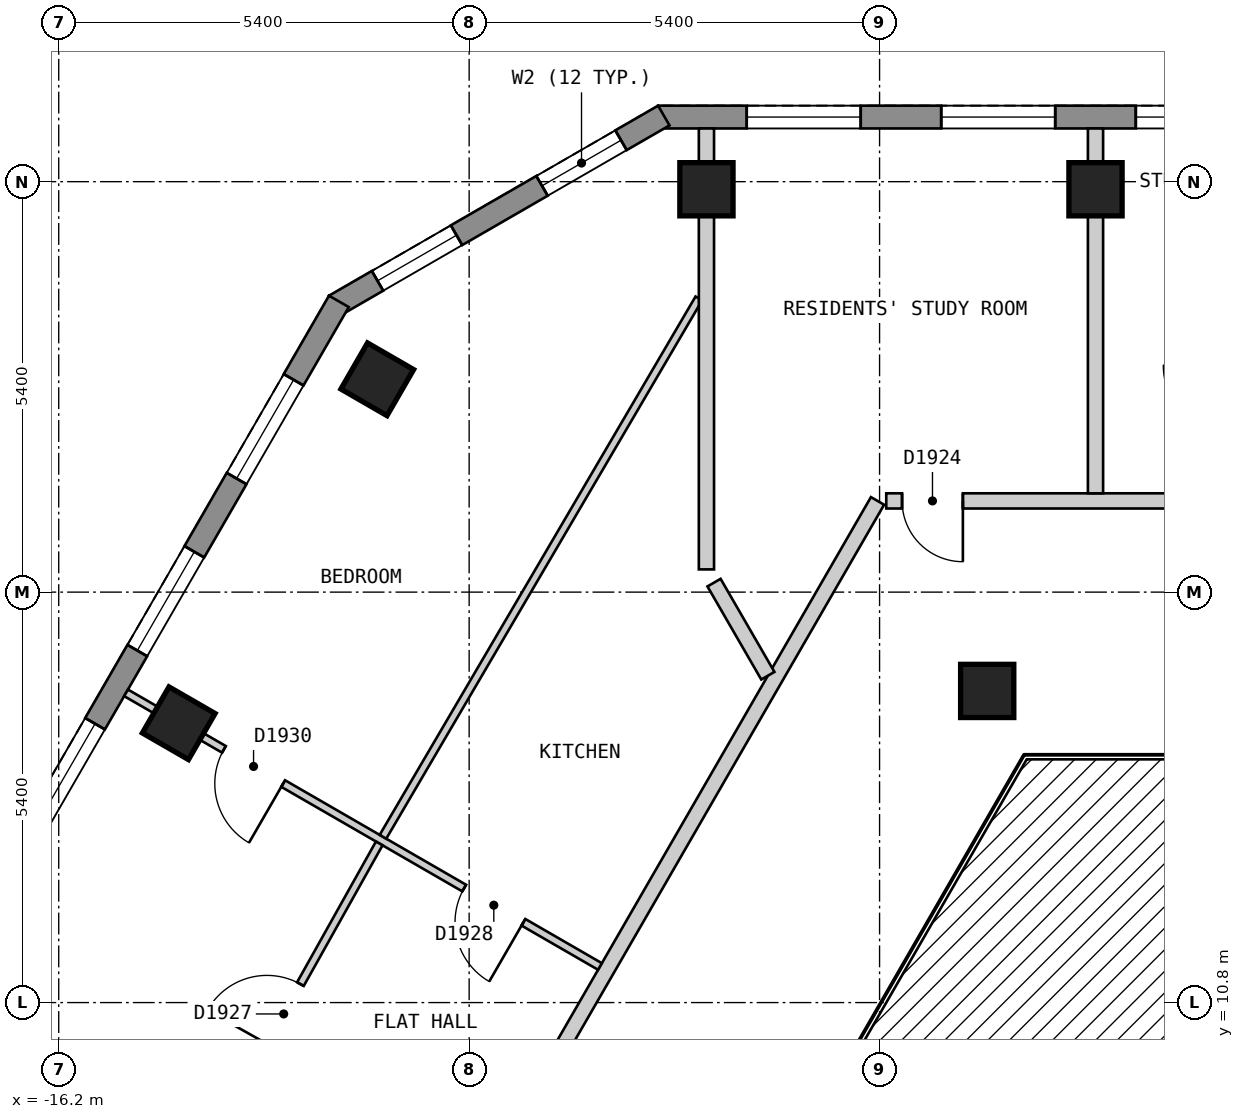
"""IFC4 building model, lengths in metres.
Left out: names, types, materials, properties, quantities, classifications, styles, units other than length and angle.
Written with IfcOpenShell. Run it as: python <this file> out.ifc"""

import sys

from ifc_helpers import new_model, si_unit, direction, frame, frame_2d, origin, origin_2d, place, context, subcontext, project, spatial, polyline, rectangle, outline, extrude, element, fill, save


model = new_model("IFC4")
c1 = context("Model", 3, precision=1e-05, world=origin(), true_north=direction((0.0, 1.0)))
c2 = subcontext(c1, "Body", "Model", "MODEL_VIEW")
j1 = project(units=[si_unit("LENGTHUNIT", "METRE"), si_unit("PLANEANGLEUNIT", "RADIAN")], contexts=[c1])
p1 = place(None, origin())
s1 = spatial("IfcSite", under=j1, at=p1, CompositionType="ELEMENT")
p2 = place(p1, origin())
s2 = spatial("IfcBuilding", under=s1, at=p2, CompositionType="ELEMENT")
p3 = place(p2, frame((0.0, 0.0, 220.8)))
s3 = spatial("IfcBuildingStorey", under=s2, at=p3, CompositionType="ELEMENT", Elevation=220.8)
for number, where, z_axis, x_axis in (
    (1, (-2.559, 21.5, 0.0), (0.0, 0.0, 1.0), (-1.0, 0.0, 0.0)),
    (2, (-7.678, 21.5, 0.0), (0.0, 0.0, 1.0), (-1.0, 0.0, 0.0)),
    (3, (-12.009, 19.0, 0.0), (0.0, 0.0, 1.0), (-0.5, -0.866, 0.0)),
    (4, (-14.621, 14.475, 0.0), (0.0, 0.0, 1.0), (-0.5, -0.866, 0.0)),
    (5, (-3.984, 14.9, 0.0), (0.0, 0.0, 1.0), (1.0, 0.0, 0.0)),
):
    element("IfcColumn", number, at=place(p3, frame(where, z_axis=z_axis, x_axis=x_axis)), inside=s3, PredefinedType="COLUMN", context=c2, shape_type="SweptSolid", body=[
        extrude(rectangle(XDim=0.7, YDim=0.7, at=origin_2d()), origin(), (0.0, 0.0, 1.0), 3.0),
    ])
p4 = place(p3, frame((8.314, 22.45, 0.0), z_axis=(0.0, 0.0, 1.0), x_axis=(-1.0, 0.0, 0.0)))
e6 = element("IfcWall", 6, at=p4, inside=s3, PredefinedType="SOLIDWALL", context=c2, shape_type="SweptSolid", body=[
    extrude(outline(polyline([(0.0, -0.15), (16.628, -0.15), (16.548, 0.15), (0.08, 0.15), (0.0, -0.15)])), origin(), (0.0, 0.0, 1.0), 2.7),
])
p5 = place(p4, frame((1.165, 0.0, 0.15)))
e7 = element("IfcOpeningElement", 7, at=p5, cuts=e6, PredefinedType="OPENING", context=c2, shape_type="SweptSolid", body=[
    extrude(rectangle(XDim=1.5, YDim=2.1, at=frame_2d((0.75, 1.05))), frame((0.0, 0.16, 0.0), z_axis=(0.0, -1.0, 0.0), x_axis=(1.0, 0.0, 0.0)), (0.0, 0.0, 1.0), 0.32),
])
p6 = place(p4, frame((3.724, 0.0, 0.15)))
e8 = element("IfcOpeningElement", 8, at=p6, cuts=e6, PredefinedType="OPENING", context=c2, shape_type="SweptSolid", body=[
    extrude(rectangle(XDim=1.5, YDim=2.1, at=frame_2d((0.75, 1.05))), frame((0.0, 0.16, 0.0), z_axis=(0.0, -1.0, 0.0), x_axis=(1.0, 0.0, 0.0)), (0.0, 0.0, 1.0), 0.32),
])
p7 = place(p4, frame((6.284, 0.0, 0.15)))
e9 = element("IfcOpeningElement", 9, at=p7, cuts=e6, PredefinedType="OPENING", context=c2, shape_type="SweptSolid", body=[
    extrude(rectangle(XDim=1.5, YDim=2.1, at=frame_2d((0.75, 1.05))), frame((0.0, 0.16, 0.0), z_axis=(0.0, -1.0, 0.0), x_axis=(1.0, 0.0, 0.0)), (0.0, 0.0, 1.0), 0.32),
])
p8 = place(p4, frame((8.843, 0.0, 0.15)))
e10 = element("IfcOpeningElement", 10, at=p8, cuts=e6, PredefinedType="OPENING", context=c2, shape_type="SweptSolid", body=[
    extrude(rectangle(XDim=1.5, YDim=2.1, at=frame_2d((0.75, 1.05))), frame((0.0, 0.16, 0.0), z_axis=(0.0, -1.0, 0.0), x_axis=(1.0, 0.0, 0.0)), (0.0, 0.0, 1.0), 0.32),
])
p9 = place(p4, frame((11.403, 0.0, 0.15)))
e11 = element("IfcOpeningElement", 11, at=p9, cuts=e6, PredefinedType="OPENING", context=c2, shape_type="SweptSolid", body=[
    extrude(rectangle(XDim=1.5, YDim=2.1, at=frame_2d((0.75, 1.05))), frame((0.0, 0.16, 0.0), z_axis=(0.0, -1.0, 0.0), x_axis=(1.0, 0.0, 0.0)), (0.0, 0.0, 1.0), 0.32),
])
p10 = place(p4, frame((13.962, 0.0, 0.15)))
e12 = element("IfcOpeningElement", 12, at=p10, cuts=e6, PredefinedType="OPENING", context=c2, shape_type="SweptSolid", body=[
    extrude(rectangle(XDim=1.5, YDim=2.1, at=frame_2d((0.75, 1.05))), frame((0.0, 0.16, 0.0), z_axis=(0.0, -1.0, 0.0), x_axis=(1.0, 0.0, 0.0)), (0.0, 0.0, 1.0), 0.32),
])
p11 = place(p3, frame((-8.239, 22.47, 0.0), z_axis=(0.0, 0.0, 1.0), x_axis=(-0.866022959057, -0.500004234368, 0.0)))
e13 = element("IfcWall", 13, at=p11, inside=s3, PredefinedType="SOLIDWALL", context=c2, shape_type="SweptSolid", body=[
    extrude(outline(polyline([(0.0, -0.15), (5.0, -0.15), (4.92, 0.15), (0.08, 0.15), (0.0, -0.15)])), origin(), (0.0, 0.0, 1.0), 2.7),
])
p12 = place(p11, frame((0.65, 0.0, 0.15)))
e14 = element("IfcOpeningElement", 14, at=p12, cuts=e13, PredefinedType="OPENING", context=c2, shape_type="SweptSolid", body=[
    extrude(rectangle(XDim=1.2, YDim=2.1, at=frame_2d((0.6, 1.05))), frame((0.0, 0.16, 0.0), z_axis=(0.0, -1.0, 0.0), x_axis=(1.0, 0.0, 0.0)), (0.0, 0.0, 1.0), 0.32),
])
p13 = place(p11, frame((3.149, 0.0, 0.15)))
e15 = element("IfcOpeningElement", 15, at=p13, cuts=e13, PredefinedType="OPENING", context=c2, shape_type="SweptSolid", body=[
    extrude(rectangle(XDim=1.2, YDim=2.1, at=frame_2d((0.6, 1.05))), frame((0.0, 0.16, 0.0), z_axis=(0.0, -1.0, 0.0), x_axis=(1.0, 0.0, 0.0)), (0.0, 0.0, 1.0), 0.32),
])
p14 = place(p3, frame((-12.514, 20.025, 0.0), z_axis=(0.0, 0.0, 1.0), x_axis=(-0.500003656944, -0.866023292436, 0.0)))
e16 = element("IfcWall", 16, at=p14, inside=s3, PredefinedType="SOLIDWALL", context=c2, shape_type="SweptSolid", body=[
    extrude(outline(polyline([(0.0, -0.15), (22.17, -0.15), (22.09, 0.15), (0.08, 0.15), (0.0, -0.15)])), origin(), (0.0, 0.0, 1.0), 2.7),
])
p15 = place(p14, frame((1.191, 0.0, 0.15)))
e17 = element("IfcOpeningElement", 17, at=p15, cuts=e16, PredefinedType="OPENING", context=c2, shape_type="SweptSolid", body=[
    extrude(rectangle(XDim=1.5, YDim=2.1, at=frame_2d((0.75, 1.05))), frame((0.0, 0.16, 0.0), z_axis=(0.0, -1.0, 0.0), x_axis=(1.0, 0.0, 0.0)), (0.0, 0.0, 1.0), 0.32),
])
p16 = place(p14, frame((3.804, 0.0, 0.15)))
e18 = element("IfcOpeningElement", 18, at=p16, cuts=e16, PredefinedType="OPENING", context=c2, shape_type="SweptSolid", body=[
    extrude(rectangle(XDim=1.5, YDim=2.1, at=frame_2d((0.75, 1.05))), frame((0.0, 0.16, 0.0), z_axis=(0.0, -1.0, 0.0), x_axis=(1.0, 0.0, 0.0)), (0.0, 0.0, 1.0), 0.32),
])
p17 = place(p14, frame((6.416, 0.0, 0.15)))
e19 = element("IfcOpeningElement", 19, at=p17, cuts=e16, PredefinedType="OPENING", context=c2, shape_type="SweptSolid", body=[
    extrude(rectangle(XDim=1.5, YDim=2.1, at=frame_2d((0.75, 1.05))), frame((0.0, 0.16, 0.0), z_axis=(0.0, -1.0, 0.0), x_axis=(1.0, 0.0, 0.0)), (0.0, 0.0, 1.0), 0.32),
])
p18 = place(p14, frame((9.029, 0.0, 0.15)))
e20 = element("IfcOpeningElement", 20, at=p18, cuts=e16, PredefinedType="OPENING", context=c2, shape_type="SweptSolid", body=[
    extrude(rectangle(XDim=1.5, YDim=2.1, at=frame_2d((0.75, 1.05))), frame((0.0, 0.16, 0.0), z_axis=(0.0, -1.0, 0.0), x_axis=(1.0, 0.0, 0.0)), (0.0, 0.0, 1.0), 0.32),
])
p19 = place(p14, frame((11.641, 0.0, 0.15)))
e21 = element("IfcOpeningElement", 21, at=p19, cuts=e16, PredefinedType="OPENING", context=c2, shape_type="SweptSolid", body=[
    extrude(rectangle(XDim=1.5, YDim=2.1, at=frame_2d((0.75, 1.05))), frame((0.0, 0.16, 0.0), z_axis=(0.0, -1.0, 0.0), x_axis=(1.0, 0.0, 0.0)), (0.0, 0.0, 1.0), 0.32),
])
p20 = place(p14, frame((14.254, 0.0, 0.15)))
e22 = element("IfcOpeningElement", 22, at=p20, cuts=e16, PredefinedType="OPENING", context=c2, shape_type="SweptSolid", body=[
    extrude(rectangle(XDim=1.5, YDim=2.1, at=frame_2d((0.75, 1.05))), frame((0.0, 0.16, 0.0), z_axis=(0.0, -1.0, 0.0), x_axis=(1.0, 0.0, 0.0)), (0.0, 0.0, 1.0), 0.32),
])
p21 = place(p14, frame((16.866, 0.0, 0.15)))
e23 = element("IfcOpeningElement", 23, at=p21, cuts=e16, PredefinedType="OPENING", context=c2, shape_type="SweptSolid", body=[
    extrude(rectangle(XDim=1.5, YDim=2.1, at=frame_2d((0.75, 1.05))), frame((0.0, 0.16, 0.0), z_axis=(0.0, -1.0, 0.0), x_axis=(1.0, 0.0, 0.0)), (0.0, 0.0, 1.0), 0.32),
])
p22 = place(p14, frame((19.479, 0.0, 0.15)))
e24 = element("IfcOpeningElement", 24, at=p22, cuts=e16, PredefinedType="OPENING", context=c2, shape_type="SweptSolid", body=[
    extrude(rectangle(XDim=1.5, YDim=2.1, at=frame_2d((0.75, 1.05))), frame((0.0, 0.16, 0.0), z_axis=(0.0, -1.0, 0.0), x_axis=(1.0, 0.0, 0.0)), (0.0, 0.0, 1.0), 0.32),
])
p23 = place(p3, frame((-5.312, 17.4, 0.0), z_axis=(0.0, 0.0, 1.0), x_axis=(1.0, 0.0, 0.0)))
e25 = element("IfcWall", 25, at=p23, inside=s3, PredefinedType="PARTITIONING", context=c2, shape_type="SweptSolid", body=[
    extrude(rectangle(XDim=10.739, YDim=0.2, at=frame_2d((5.37, 0.0))), origin(), (0.0, 0.0, 1.0), 2.7),
])
p24 = place(p23, frame((9.534, 0.0, 0.0)))
e26 = element("IfcOpeningElement", 26, at=p24, cuts=e25, PredefinedType="OPENING", context=c2, shape_type="SweptSolid", body=[
    extrude(rectangle(XDim=1.0, YDim=2.1, at=frame_2d((0.5, 1.05))), frame((0.0, 0.11, 0.0), z_axis=(0.0, -1.0, 0.0), x_axis=(1.0, 0.0, 0.0)), (0.0, 0.0, 1.0), 0.22),
])
p25 = place(p23, frame((4.812, 0.0, 0.0)))
e27 = element("IfcOpeningElement", 27, at=p25, cuts=e25, PredefinedType="OPENING", context=c2, shape_type="SweptSolid", body=[
    extrude(rectangle(XDim=1.0, YDim=2.1, at=frame_2d((0.5, 1.05))), frame((0.0, 0.11, 0.0), z_axis=(0.0, -1.0, 0.0), x_axis=(1.0, 0.0, 0.0)), (0.0, 0.0, 1.0), 0.22),
])
p26 = place(p23, frame((0.208, 0.0, 0.0)))
e28 = element("IfcOpeningElement", 28, at=p26, cuts=e25, PredefinedType="OPENING", context=c2, shape_type="SweptSolid", body=[
    extrude(rectangle(XDim=0.8, YDim=2.1, at=frame_2d((0.4, 1.05))), frame((0.0, 0.11, 0.0), z_axis=(0.0, -1.0, 0.0), x_axis=(1.0, 0.0, 0.0)), (0.0, 0.0, 1.0), 0.22),
])
p27 = place(p3, frame((-10.854, 8.0, 0.0), z_axis=(0.0, 0.0, 1.0), x_axis=(0.499997637144, 0.866026767976, 0.0)))
e29 = element("IfcWall", 29, at=p27, inside=s3, PredefinedType="PARTITIONING", context=c2, shape_type="SweptSolid", body=[
    extrude(rectangle(XDim=10.854, YDim=0.2, at=frame_2d((5.427, 0.0))), origin(), (0.0, 0.0, 1.0), 2.7),
])
p28 = place(p27, frame((0.612, 0.0, 0.0)))
e30 = element("IfcOpeningElement", 30, at=p28, cuts=e29, PredefinedType="OPENING", context=c2, shape_type="SweptSolid", body=[
    extrude(rectangle(XDim=1.0, YDim=2.1, at=frame_2d((0.5, 1.05))), frame((0.0, 0.11, 0.0), z_axis=(0.0, -1.0, 0.0), x_axis=(1.0, 0.0, 0.0)), (0.0, 0.0, 1.0), 0.22),
])
p29 = place(p3, frame((-15.314, 14.875, 0.0), z_axis=(0.0, 0.0, 1.0), x_axis=(0.866001485781, -0.500041424909, 0.0)))
e31 = element("IfcWall", 31, at=p29, inside=s3, PredefinedType="PARTITIONING", context=c2, shape_type="SweptSolid", body=[
    extrude(rectangle(XDim=7.2, YDim=0.1, at=frame_2d((3.6, 0.0))), origin(), (0.0, 0.0, 1.0), 2.7),
])
p30 = place(p29, frame((5.137, 0.0, 0.0)))
e32 = element("IfcOpeningElement", 32, at=p30, cuts=e31, PredefinedType="OPENING", context=c2, shape_type="SweptSolid", body=[
    extrude(rectangle(XDim=0.9, YDim=2.1, at=frame_2d((0.45, 1.05))), frame((0.0, 0.06, 0.0), z_axis=(0.0, -1.0, 0.0), x_axis=(1.0, 0.0, 0.0)), (0.0, 0.0, 1.0), 0.12),
])
p31 = place(p29, frame((1.487, 0.0, 0.0)))
e33 = element("IfcOpeningElement", 33, at=p31, cuts=e31, PredefinedType="OPENING", context=c2, shape_type="SweptSolid", body=[
    extrude(rectangle(XDim=0.9, YDim=2.1, at=frame_2d((0.45, 1.05))), frame((0.0, 0.06, 0.0), z_axis=(0.0, -1.0, 0.0), x_axis=(1.0, 0.0, 0.0)), (0.0, 0.0, 1.0), 0.12),
])
p32 = place(p3, frame((-11.934, 12.981, 0.0), z_axis=(0.0, 0.0, 1.0), x_axis=(0.506072703404, 0.862490822484, 0.0)))
e34 = element("IfcWall", 34, at=p32, inside=s3, PredefinedType="PARTITIONING", context=c2, shape_type="SweptSolid", body=[
    extrude(rectangle(XDim=8.212, YDim=0.1, at=frame_2d((4.106, 0.0))), origin(), (0.0, 0.0, 1.0), 2.7),
])
p33 = place(p3, frame((-14.522, 8.362, 0.0), z_axis=(0.0, 0.0, 1.0), x_axis=(0.488772229601, 0.872411432508, 0.0)))
e35 = element("IfcWall", 35, at=p33, inside=s3, PredefinedType="PARTITIONING", context=c2, shape_type="SweptSolid", body=[
    extrude(rectangle(XDim=5.195, YDim=0.1, at=frame_2d((2.597, 0.0))), origin(), (0.0, 0.0, 1.0), 2.7),
])
p34 = place(p33, frame((2.173, 0.0, 0.0)))
e36 = element("IfcOpeningElement", 36, at=p34, cuts=e35, PredefinedType="OPENING", context=c2, shape_type="SweptSolid", body=[
    extrude(rectangle(XDim=0.9, YDim=2.1, at=frame_2d((0.45, 1.05))), frame((0.0, 0.06, 0.0), z_axis=(0.0, -1.0, 0.0), x_axis=(1.0, 0.0, 0.0)), (0.0, 0.0, 1.0), 0.12),
])
p35 = place(p3, frame((-7.578, 16.325, 0.0), z_axis=(0.0, 0.0, 1.0), x_axis=(0.500314976313, -0.865843475737, 0.0)))
e37 = element("IfcWall", 37, at=p35, inside=s3, PredefinedType="PARTITIONING", context=c2, shape_type="SweptSolid", body=[
    extrude(rectangle(XDim=1.415, YDim=0.2, at=frame_2d((0.707, 0.0))), origin(), (0.0, 0.0, 1.0), 2.7),
])
p36 = place(p3, frame((-2.559, 22.3, 0.0), z_axis=(0.0, 0.0, 1.0), x_axis=(0.0, -1.0, 0.0)))
e38 = element("IfcWall", 38, at=p36, inside=s3, PredefinedType="PARTITIONING", context=c2, shape_type="SweptSolid", body=[
    extrude(rectangle(XDim=4.8, YDim=0.2, at=frame_2d((2.4, 0.0))), origin(), (0.0, 0.0, 1.0), 2.7),
])
p37 = place(p3, frame((-7.678, 16.499, 0.0), z_axis=(0.0, 0.0, 1.0), x_axis=(0.0, 1.0, 0.0)))
e39 = element("IfcWall", 39, at=p37, inside=s3, PredefinedType="PARTITIONING", context=c2, shape_type="SweptSolid", body=[
    extrude(rectangle(XDim=5.801, YDim=0.2, at=frame_2d((2.9, 0.0))), origin(), (0.0, 0.0, 1.0), 2.7),
])
p38 = place(p8, origin())
e40 = element("IfcWindow", 40, at=p38, inside=s3, PartitioningType="SINGLE_PANEL", PredefinedType="WINDOW", context=c2, shape_type="SweptSolid", body=[
    extrude(rectangle(XDim=1.5, YDim=2.1, at=frame_2d((0.75, 1.05))), frame((0.0, 0.03, 0.0), z_axis=(0.0, -1.0, 0.0), x_axis=(1.0, 0.0, 0.0)), (0.0, 0.0, 1.0), 0.06),
])
fill(e10, e40)
p39 = place(p9, origin())
e41 = element("IfcWindow", 41, at=p39, inside=s3, PartitioningType="SINGLE_PANEL", PredefinedType="WINDOW", context=c2, shape_type="SweptSolid", body=[
    extrude(rectangle(XDim=1.5, YDim=2.1, at=frame_2d((0.75, 1.05))), frame((0.0, 0.03, 0.0), z_axis=(0.0, -1.0, 0.0), x_axis=(1.0, 0.0, 0.0)), (0.0, 0.0, 1.0), 0.06),
])
fill(e11, e41)
p40 = place(p10, origin())
e42 = element("IfcWindow", 42, at=p40, inside=s3, PartitioningType="SINGLE_PANEL", PredefinedType="WINDOW", context=c2, shape_type="SweptSolid", body=[
    extrude(rectangle(XDim=1.5, YDim=2.1, at=frame_2d((0.75, 1.05))), frame((0.0, 0.03, 0.0), z_axis=(0.0, -1.0, 0.0), x_axis=(1.0, 0.0, 0.0)), (0.0, 0.0, 1.0), 0.06),
])
fill(e12, e42)
p41 = place(p12, origin())
e43 = element("IfcWindow", 43, at=p41, inside=s3, PartitioningType="SINGLE_PANEL", PredefinedType="WINDOW", context=c2, shape_type="SweptSolid", body=[
    extrude(rectangle(XDim=1.2, YDim=2.1, at=frame_2d((0.6, 1.05))), frame((0.0, 0.03, 0.0), z_axis=(0.0, -1.0, 0.0), x_axis=(1.0, 0.0, 0.0)), (0.0, 0.0, 1.0), 0.06),
])
fill(e14, e43)
p42 = place(p13, origin())
e44 = element("IfcWindow", 44, at=p42, inside=s3, PartitioningType="SINGLE_PANEL", PredefinedType="WINDOW", context=c2, shape_type="SweptSolid", body=[
    extrude(rectangle(XDim=1.2, YDim=2.1, at=frame_2d((0.6, 1.05))), frame((0.0, 0.03, 0.0), z_axis=(0.0, -1.0, 0.0), x_axis=(1.0, 0.0, 0.0)), (0.0, 0.0, 1.0), 0.06),
])
fill(e15, e44)
p43 = place(p15, origin())
e45 = element("IfcWindow", 45, at=p43, inside=s3, PartitioningType="SINGLE_PANEL", PredefinedType="WINDOW", context=c2, shape_type="SweptSolid", body=[
    extrude(rectangle(XDim=1.5, YDim=2.1, at=frame_2d((0.75, 1.05))), frame((0.0, 0.03, 0.0), z_axis=(0.0, -1.0, 0.0), x_axis=(1.0, 0.0, 0.0)), (0.0, 0.0, 1.0), 0.06),
])
fill(e17, e45)
p44 = place(p16, origin())
e46 = element("IfcWindow", 46, at=p44, inside=s3, PartitioningType="SINGLE_PANEL", PredefinedType="WINDOW", context=c2, shape_type="SweptSolid", body=[
    extrude(rectangle(XDim=1.5, YDim=2.1, at=frame_2d((0.75, 1.05))), frame((0.0, 0.03, 0.0), z_axis=(0.0, -1.0, 0.0), x_axis=(1.0, 0.0, 0.0)), (0.0, 0.0, 1.0), 0.06),
])
fill(e18, e46)
p45 = place(p17, origin())
e47 = element("IfcWindow", 47, at=p45, inside=s3, PartitioningType="SINGLE_PANEL", PredefinedType="WINDOW", context=c2, shape_type="SweptSolid", body=[
    extrude(rectangle(XDim=1.5, YDim=2.1, at=frame_2d((0.75, 1.05))), frame((0.0, 0.03, 0.0), z_axis=(0.0, -1.0, 0.0), x_axis=(1.0, 0.0, 0.0)), (0.0, 0.0, 1.0), 0.06),
])
fill(e19, e47)
p46 = place(p26, origin())
e48 = element("IfcDoor", 48, at=p46, inside=s3, OperationType="SINGLE_SWING_RIGHT", PredefinedType="DOOR", context=c2, shape_type="SweptSolid", body=[
    extrude(rectangle(XDim=0.8, YDim=2.1, at=frame_2d((0.4, 1.05))), frame((0.0, 0.025, 0.0), z_axis=(0.0, -1.0, 0.0), x_axis=(1.0, 0.0, 0.0)), (0.0, 0.0, 1.0), 0.05),
])
fill(e28, e48)
p47 = place(p34, origin())
e49 = element("IfcDoor", 49, at=p47, inside=s3, OperationType="SINGLE_SWING_LEFT", PredefinedType="DOOR", context=c2, shape_type="SweptSolid", body=[
    extrude(rectangle(XDim=0.9, YDim=2.1, at=frame_2d((0.45, 1.05))), frame((0.0, 0.025, 0.0), z_axis=(0.0, -1.0, 0.0), x_axis=(1.0, 0.0, 0.0)), (0.0, 0.0, 1.0), 0.05),
])
fill(e36, e49)
p48 = place(p30, origin())
e50 = element("IfcDoor", 50, at=p48, inside=s3, OperationType="SINGLE_SWING_RIGHT", PredefinedType="DOOR", context=c2, shape_type="SweptSolid", body=[
    extrude(rectangle(XDim=0.9, YDim=2.1, at=frame_2d((0.45, 1.05))), frame((0.0, 0.025, 0.0), z_axis=(0.0, -1.0, 0.0), x_axis=(1.0, 0.0, 0.0)), (0.0, 0.0, 1.0), 0.05),
])
fill(e32, e50)
p49 = place(p31, origin())
e51 = element("IfcDoor", 51, at=p49, inside=s3, OperationType="SINGLE_SWING_RIGHT", PredefinedType="DOOR", context=c2, shape_type="SweptSolid", body=[
    extrude(rectangle(XDim=0.9, YDim=2.1, at=frame_2d((0.45, 1.05))), frame((0.0, 0.025, 0.0), z_axis=(0.0, -1.0, 0.0), x_axis=(1.0, 0.0, 0.0)), (0.0, 0.0, 1.0), 0.05),
])
fill(e33, e51)
save(model, sys.argv[1])
